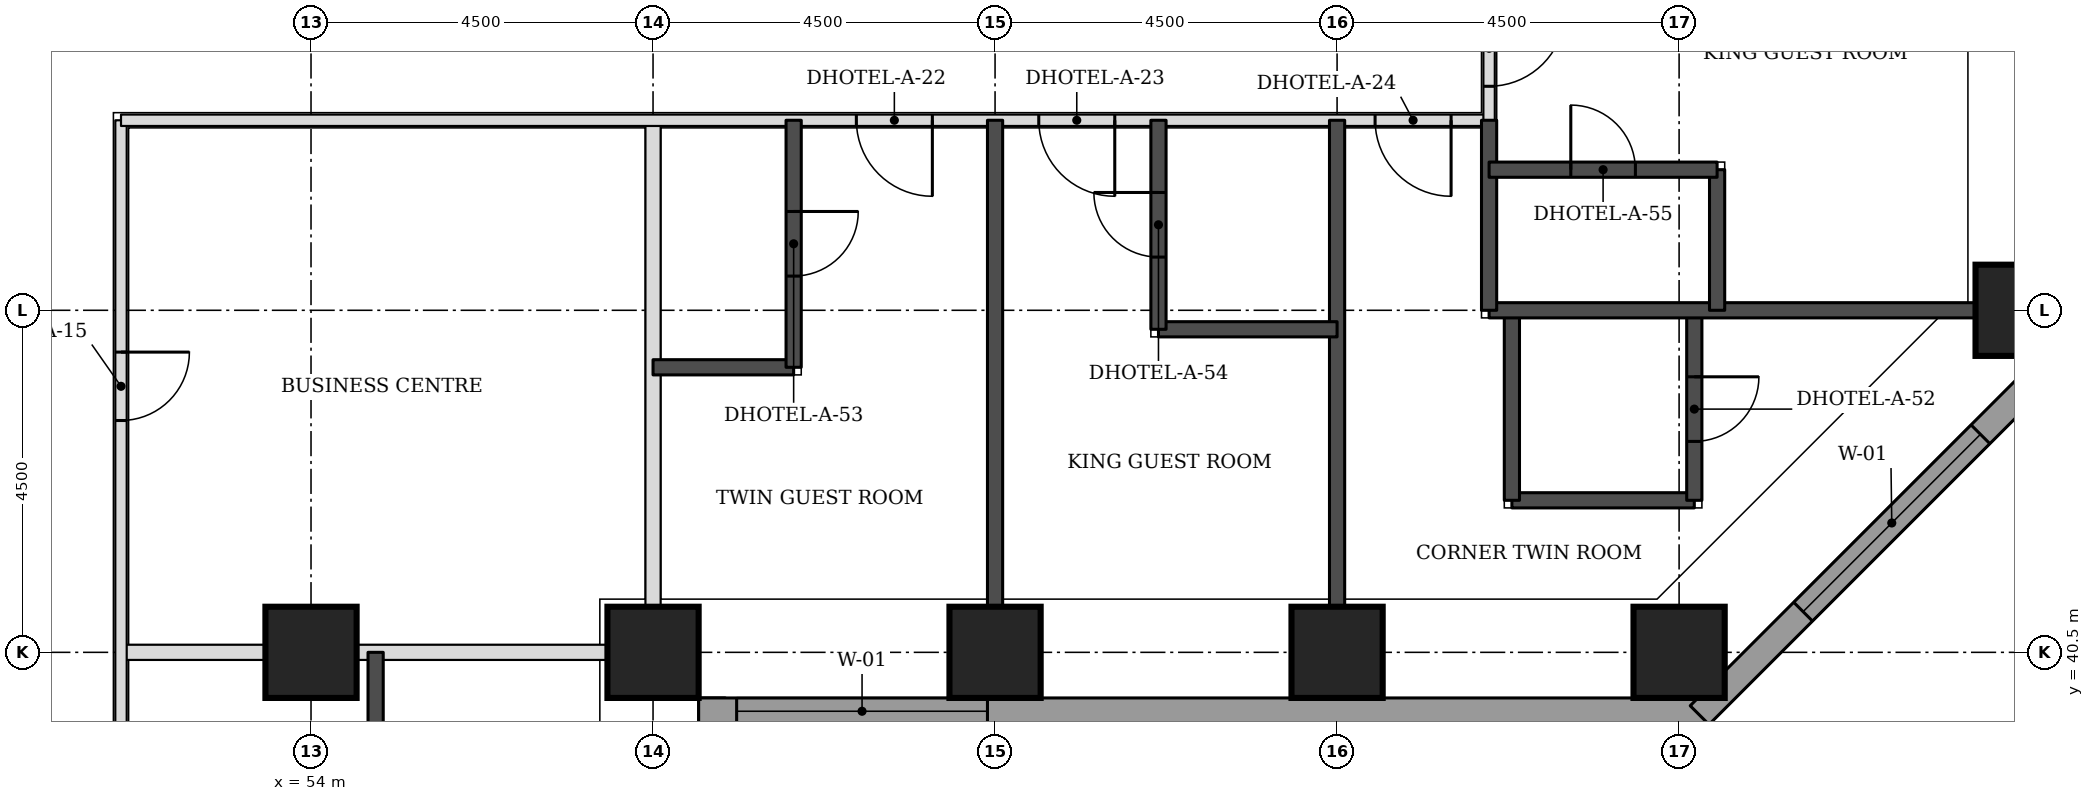
"""IFC4 building model, lengths in metres.
Left out: names, types, materials, properties, quantities, classifications, styles, units other than length and angle.
Written with IfcOpenShell. Run it as: python <this file> out.ifc"""

import sys

from ifc_helpers import new_model, si_unit, direction, frame, frame_2d, origin, origin_2d, place, context, subcontext, project, spatial, rectangle, extrude, element, fill, save


model = new_model("IFC4")
c1 = context("Model", 3, precision=1e-05, world=origin(), true_north=direction((0.0, 1.0)))
c2 = subcontext(c1, "Body", "Model", "MODEL_VIEW")
j1 = project(units=[si_unit("LENGTHUNIT", "METRE"), si_unit("PLANEANGLEUNIT", "RADIAN")], contexts=[c1])
p1 = place(None, origin())
s1 = spatial("IfcSite", under=j1, at=p1, CompositionType="ELEMENT")
p2 = place(p1, origin())
s2 = spatial("IfcBuilding", under=s1, at=p2, CompositionType="ELEMENT")
p3 = place(p2, frame((0.0, 0.0, 26.4)))
s3 = spatial("IfcBuildingStorey", under=s2, at=p3, CompositionType="ELEMENT", Elevation=26.4)
for number, where, z_axis, x_axis in (
    (1, (54.0, 40.5, 0.0), (0.0, 0.0, 1.0), (1.0, 0.0, 0.0)),
    (2, (58.5, 40.5, 0.0), (0.0, 0.0, 1.0), (1.0, 0.0, 0.0)),
    (3, (63.0, 40.5, 0.0), (0.0, 0.0, 1.0), (1.0, 0.0, 0.0)),
    (4, (67.5, 40.5, 0.0), (0.0, 0.0, 1.0), (1.0, 0.0, 0.0)),
    (5, (72.0, 40.5, 0.0), (0.0, 0.0, 1.0), (1.0, 0.0, 0.0)),
    (6, (76.5, 45.0, 0.0), (0.0, 0.0, 1.0), (1.0, 0.0, 0.0)),
):
    element("IfcColumn", number, at=place(p3, frame(where, z_axis=z_axis, x_axis=x_axis)), inside=s3, PredefinedType="COLUMN", context=c2, shape_type="SweptSolid", body=[
        extrude(rectangle(XDim=1.2, YDim=1.2, at=origin_2d()), origin(), (0.0, 0.0, 1.0), 3.3),
    ])
p4 = place(p3, frame((59.275, 22.106, 0.0), z_axis=(0.0, 0.0, 1.0), x_axis=(0.0, 1.0, 0.0)))
e7 = element("IfcWall", 7, at=p4, inside=s3, PredefinedType="STANDARD", context=c2, shape_type="SweptSolid", body=[
    extrude(rectangle(XDim=17.793, YDim=0.35, at=frame_2d((8.897, 0.0))), origin(), (0.0, 0.0, 1.0), 3.055),
])
p5 = place(p4, frame((5.493, 0.0, 0.8)))
e8 = element("IfcOpeningElement", 8, at=p5, cuts=e7, PredefinedType="OPENING", context=c2, shape_type="SweptSolid", body=[
    extrude(rectangle(XDim=3.3, YDim=1.5, at=frame_2d((1.65, 0.75))), frame((0.0, 0.185, 0.0), z_axis=(0.0, -1.0, 0.0), x_axis=(1.0, 0.0, 0.0)), (0.0, 0.0, 1.0), 0.37),
])
p6 = place(p4, frame((13.993, 0.0, 0.8)))
e9 = element("IfcOpeningElement", 9, at=p6, cuts=e7, PredefinedType="OPENING", context=c2, shape_type="SweptSolid", body=[
    extrude(rectangle(XDim=3.3, YDim=1.5, at=frame_2d((1.65, 0.75))), frame((0.0, 0.185, 0.0), z_axis=(0.0, -1.0, 0.0), x_axis=(1.0, 0.0, 0.0)), (0.0, 0.0, 1.0), 0.37),
])
p7 = place(p3, frame((59.1, 39.725, 0.0), z_axis=(0.0, 0.0, 1.0), x_axis=(1.0, 0.0, 0.0)))
e10 = element("IfcWall", 10, at=p7, inside=s3, PredefinedType="STANDARD", context=c2, shape_type="SweptSolid", body=[
    extrude(rectangle(XDim=13.293, YDim=0.35, at=frame_2d((6.647, 0.0))), origin(), (0.0, 0.0, 1.0), 3.055),
])
p8 = place(p7, frame((0.5, 0.0, 0.8)))
e11 = element("IfcOpeningElement", 11, at=p8, cuts=e10, PredefinedType="OPENING", context=c2, shape_type="SweptSolid", body=[
    extrude(rectangle(XDim=3.3, YDim=1.5, at=frame_2d((1.65, 0.75))), frame((0.0, 0.185, 0.0), z_axis=(0.0, -1.0, 0.0), x_axis=(1.0, 0.0, 0.0)), (0.0, 0.0, 1.0), 0.37),
])
p9 = place(p3, frame((72.27, 39.674, 0.0), z_axis=(0.0, 0.0, 1.0), x_axis=(0.707106781187, 0.707106781187, 0.0)))
e12 = element("IfcWall", 12, at=p9, inside=s3, PredefinedType="STANDARD", context=c2, shape_type="SweptSolid", body=[
    extrude(rectangle(XDim=7.151, YDim=0.35, at=frame_2d((3.576, 0.0))), origin(), (0.0, 0.0, 1.0), 3.055),
])
p10 = place(p9, frame((1.926, 0.0, 0.8)))
e13 = element("IfcOpeningElement", 13, at=p10, cuts=e12, PredefinedType="OPENING", context=c2, shape_type="SweptSolid", body=[
    extrude(rectangle(XDim=3.3, YDim=1.5, at=frame_2d((1.65, 0.75))), frame((0.0, 0.185, 0.0), z_axis=(0.0, -1.0, 0.0), x_axis=(1.0, 0.0, 0.0)), (0.0, 0.0, 1.0), 0.37),
])
p11 = place(p3, frame((51.5, 40.5, 0.0), z_axis=(0.0, 0.0, 1.0), x_axis=(1.0, 0.0, 0.0)))
e14 = element("IfcWall", 14, at=p11, inside=s3, PredefinedType="PARTITIONING", context=c2, shape_type="SweptSolid", body=[
    extrude(rectangle(XDim=6.4, YDim=0.2, at=frame_2d((3.2, 0.0))), origin(), (0.0, 0.0, 1.0), 2.33),
])
p12 = place(p3, frame((58.5, 41.1, 0.0), z_axis=(0.0, 0.0, 1.0), x_axis=(0.0, 1.0, 0.0)))
e15 = element("IfcWall", 15, at=p12, inside=s3, PredefinedType="PARTITIONING", context=c2, shape_type="SweptSolid", body=[
    extrude(rectangle(XDim=6.4, YDim=0.2, at=frame_2d((3.2, 0.0))), origin(), (0.0, 0.0, 1.0), 3.08),
])
p13 = place(p3, frame((51.5, 23.65, 0.0), z_axis=(0.0, 0.0, 1.0), x_axis=(0.0, 1.0, 0.0)))
e16 = element("IfcWall", 16, at=p13, inside=s3, PredefinedType="PARTITIONING", context=c2, shape_type="SweptSolid", body=[
    extrude(rectangle(XDim=23.85, YDim=0.15, at=frame_2d((11.925, 0.0))), origin(), (0.0, 0.0, 1.0), 3.08),
])
p14 = place(p13, frame((4.075, 0.0, 0.0)))
e17 = element("IfcOpeningElement", 17, at=p14, cuts=e16, PredefinedType="OPENING", context=c2, shape_type="SweptSolid", body=[
    extrude(rectangle(XDim=1.0, YDim=2.1, at=frame_2d((0.5, 1.05))), frame((0.0, 0.085, 0.0), z_axis=(0.0, -1.0, 0.0), x_axis=(1.0, 0.0, 0.0)), (0.0, 0.0, 1.0), 0.17),
])
p15 = place(p13, frame((10.375, 0.0, 0.0)))
e18 = element("IfcOpeningElement", 18, at=p15, cuts=e16, PredefinedType="OPENING", context=c2, shape_type="SweptSolid", body=[
    extrude(rectangle(XDim=1.0, YDim=2.1, at=frame_2d((0.5, 1.05))), frame((0.0, 0.085, 0.0), z_axis=(0.0, -1.0, 0.0), x_axis=(1.0, 0.0, 0.0)), (0.0, 0.0, 1.0), 0.17),
])
p16 = place(p13, frame((19.9, 0.0, 0.0)))
e19 = element("IfcOpeningElement", 19, at=p16, cuts=e16, PredefinedType="OPENING", context=c2, shape_type="SweptSolid", body=[
    extrude(rectangle(XDim=0.9, YDim=2.1, at=frame_2d((0.45, 1.05))), frame((0.0, 0.085, 0.0), z_axis=(0.0, -1.0, 0.0), x_axis=(1.0, 0.0, 0.0)), (0.0, 0.0, 1.0), 0.17),
])
p17 = place(p3, frame((51.5, 47.5, 0.0), z_axis=(0.0, 0.0, 1.0), x_axis=(1.0, 0.0, 0.0)))
e20 = element("IfcWall", 20, at=p17, inside=s3, PredefinedType="PARTITIONING", context=c2, shape_type="SweptSolid", body=[
    extrude(rectangle(XDim=18.0, YDim=0.15, at=frame_2d((9.0, 0.0))), origin(), (0.0, 0.0, 1.0), 3.08),
])
p18 = place(p17, frame((12.075, 0.0, 0.0)))
e21 = element("IfcOpeningElement", 21, at=p18, cuts=e20, PredefinedType="OPENING", context=c2, shape_type="SweptSolid", body=[
    extrude(rectangle(XDim=1.0, YDim=2.1, at=frame_2d((0.5, 1.05))), frame((0.0, 0.085, 0.0), z_axis=(0.0, -1.0, 0.0), x_axis=(1.0, 0.0, 0.0)), (0.0, 0.0, 1.0), 0.17),
])
p19 = place(p17, frame((9.675, 0.0, 0.0)))
e22 = element("IfcOpeningElement", 22, at=p19, cuts=e20, PredefinedType="OPENING", context=c2, shape_type="SweptSolid", body=[
    extrude(rectangle(XDim=1.0, YDim=2.1, at=frame_2d((0.5, 1.05))), frame((0.0, 0.085, 0.0), z_axis=(0.0, -1.0, 0.0), x_axis=(1.0, 0.0, 0.0)), (0.0, 0.0, 1.0), 0.17),
])
p20 = place(p17, frame((16.5, 0.0, 0.0)))
e23 = element("IfcOpeningElement", 23, at=p20, cuts=e20, PredefinedType="OPENING", context=c2, shape_type="SweptSolid", body=[
    extrude(rectangle(XDim=1.0, YDim=2.1, at=frame_2d((0.5, 1.05))), frame((0.0, 0.085, 0.0), z_axis=(0.0, -1.0, 0.0), x_axis=(1.0, 0.0, 0.0)), (0.0, 0.0, 1.0), 0.17),
])
p21 = place(p3, frame((69.5, 47.5, 0.0), z_axis=(0.0, 0.0, 1.0), x_axis=(0.0, 1.0, 0.0)))
e24 = element("IfcWall", 24, at=p21, inside=s3, PredefinedType="PARTITIONING", context=c2, shape_type="SweptSolid", body=[
    extrude(rectangle(XDim=26.5, YDim=0.15, at=frame_2d((13.25, 0.0))), origin(), (0.0, 0.0, 1.0), 3.08),
])
p22 = place(p21, frame((22.525, 0.0, 0.0)))
e25 = element("IfcOpeningElement", 25, at=p22, cuts=e24, PredefinedType="OPENING", context=c2, shape_type="SweptSolid", body=[
    extrude(rectangle(XDim=1.0, YDim=2.1, at=frame_2d((0.5, 1.05))), frame((0.0, 0.085, 0.0), z_axis=(0.0, -1.0, 0.0), x_axis=(1.0, 0.0, 0.0)), (0.0, 0.0, 1.0), 0.17),
])
p23 = place(p21, frame((16.225, 0.0, 0.0)))
e26 = element("IfcOpeningElement", 26, at=p23, cuts=e24, PredefinedType="OPENING", context=c2, shape_type="SweptSolid", body=[
    extrude(rectangle(XDim=1.0, YDim=2.1, at=frame_2d((0.5, 1.05))), frame((0.0, 0.085, 0.0), z_axis=(0.0, -1.0, 0.0), x_axis=(1.0, 0.0, 0.0)), (0.0, 0.0, 1.0), 0.17),
])
p24 = place(p21, frame((4.25, 0.0, 0.0)))
e27 = element("IfcOpeningElement", 27, at=p24, cuts=e24, PredefinedType="OPENING", context=c2, shape_type="SweptSolid", body=[
    extrude(rectangle(XDim=1.1, YDim=2.1, at=frame_2d((0.55, 1.05))), frame((0.0, 0.085, 0.0), z_axis=(0.0, -1.0, 0.0), x_axis=(1.0, 0.0, 0.0)), (0.0, 0.0, 1.0), 0.17),
])
p25 = place(p21, frame((0.447, 0.0, 0.0)))
e28 = element("IfcOpeningElement", 28, at=p25, cuts=e24, PredefinedType="OPENING", context=c2, shape_type="SweptSolid", body=[
    extrude(rectangle(XDim=1.0, YDim=2.1, at=frame_2d((0.5, 1.05))), frame((0.0, 0.085, 0.0), z_axis=(0.0, -1.0, 0.0), x_axis=(1.0, 0.0, 0.0)), (0.0, 0.0, 1.0), 0.17),
])
p26 = place(p3, frame((54.85, 37.55, 0.0), z_axis=(0.0, 0.0, 1.0), x_axis=(0.0, 1.0, 0.0)))
e29 = element("IfcWall", 29, at=p26, inside=s3, PredefinedType="SOLIDWALL", context=c2, shape_type="SweptSolid", body=[
    extrude(rectangle(XDim=2.95, YDim=0.2, at=frame_2d((1.475, 0.0))), origin(), (0.0, 0.0, 1.0), 3.08),
])
for number, where, z_axis, x_axis in (
    (30, (63.0, 41.1, 0.0), (0.0, 0.0, 1.0), (0.0, 1.0, 0.0)),
    (31, (67.5, 41.1, 0.0), (0.0, 0.0, 1.0), (0.0, 1.0, 0.0)),
):
    element("IfcWall", number, at=place(p3, frame(where, z_axis=z_axis, x_axis=x_axis)), inside=s3, PredefinedType="SOLIDWALL", context=c2, shape_type="SweptSolid", body=[
        extrude(rectangle(XDim=6.4, YDim=0.2, at=frame_2d((3.2, 0.0))), origin(), (0.0, 0.0, 1.0), 3.08),
    ])
p27 = place(p3, frame((69.8, 42.5, 0.0), z_axis=(0.0, 0.0, 1.0), x_axis=(1.0, 0.0, 0.0)))
e32 = element("IfcWall", 32, at=p27, inside=s3, PredefinedType="SOLIDWALL", context=c2, shape_type="SweptSolid", body=[
    extrude(rectangle(XDim=2.4, YDim=0.2, at=frame_2d((1.2, 0.0))), origin(), (0.0, 0.0, 1.0), 3.08),
])
p28 = place(p3, frame((69.8, 42.5, 0.0), z_axis=(0.0, 0.0, 1.0), x_axis=(0.0, 1.0, 0.0)))
e33 = element("IfcWall", 33, at=p28, inside=s3, PredefinedType="SOLIDWALL", context=c2, shape_type="SweptSolid", body=[
    extrude(rectangle(XDim=2.5, YDim=0.2, at=frame_2d((1.25, 0.0))), origin(), (0.0, 0.0, 1.0), 3.08),
])
p29 = place(p3, frame((72.2, 42.5, 0.0), z_axis=(0.0, 0.0, 1.0), x_axis=(0.0, 1.0, 0.0)))
e34 = element("IfcWall", 34, at=p29, inside=s3, PredefinedType="SOLIDWALL", context=c2, shape_type="SweptSolid", body=[
    extrude(rectangle(XDim=2.5, YDim=0.2, at=frame_2d((1.25, 0.0))), origin(), (0.0, 0.0, 1.0), 3.08),
])
p30 = place(p29, frame((0.775, 0.0, 0.0)))
e35 = element("IfcOpeningElement", 35, at=p30, cuts=e34, PredefinedType="OPENING", context=c2, shape_type="SweptSolid", body=[
    extrude(rectangle(XDim=0.85, YDim=2.1, at=frame_2d((0.425, 1.05))), frame((0.0, 0.11, 0.0), z_axis=(0.0, -1.0, 0.0), x_axis=(1.0, 0.0, 0.0)), (0.0, 0.0, 1.0), 0.22),
])
p31 = place(p3, frame((58.5, 44.25, 0.0), z_axis=(0.0, 0.0, 1.0), x_axis=(1.0, 0.0, 0.0)))
e36 = element("IfcWall", 36, at=p31, inside=s3, PredefinedType="SOLIDWALL", context=c2, shape_type="SweptSolid", body=[
    extrude(rectangle(XDim=1.85, YDim=0.2, at=frame_2d((0.925, 0.0))), origin(), (0.0, 0.0, 1.0), 3.08),
])
p32 = place(p3, frame((60.35, 44.25, 0.0), z_axis=(0.0, 0.0, 1.0), x_axis=(0.0, 1.0, 0.0)))
e37 = element("IfcWall", 37, at=p32, inside=s3, PredefinedType="SOLIDWALL", context=c2, shape_type="SweptSolid", body=[
    extrude(rectangle(XDim=3.25, YDim=0.2, at=frame_2d((1.625, 0.0))), origin(), (0.0, 0.0, 1.0), 3.08),
])
p33 = place(p32, frame((1.2, 0.0, 0.0)))
e38 = element("IfcOpeningElement", 38, at=p33, cuts=e37, PredefinedType="OPENING", context=c2, shape_type="SweptSolid", body=[
    extrude(rectangle(XDim=0.85, YDim=2.1, at=frame_2d((0.425, 1.05))), frame((0.0, 0.11, 0.0), z_axis=(0.0, -1.0, 0.0), x_axis=(1.0, 0.0, 0.0)), (0.0, 0.0, 1.0), 0.22),
])
p34 = place(p3, frame((65.15, 44.75, 0.0), z_axis=(0.0, 0.0, 1.0), x_axis=(1.0, 0.0, 0.0)))
e39 = element("IfcWall", 39, at=p34, inside=s3, PredefinedType="SOLIDWALL", context=c2, shape_type="SweptSolid", body=[
    extrude(rectangle(XDim=2.35, YDim=0.2, at=frame_2d((1.175, 0.0))), origin(), (0.0, 0.0, 1.0), 3.08),
])
p35 = place(p3, frame((65.15, 44.75, 0.0), z_axis=(0.0, 0.0, 1.0), x_axis=(0.0, 1.0, 0.0)))
e40 = element("IfcWall", 40, at=p35, inside=s3, PredefinedType="SOLIDWALL", context=c2, shape_type="SweptSolid", body=[
    extrude(rectangle(XDim=2.75, YDim=0.2, at=frame_2d((1.375, 0.0))), origin(), (0.0, 0.0, 1.0), 3.08),
])
p36 = place(p35, frame((0.95, 0.0, 0.0)))
e41 = element("IfcOpeningElement", 41, at=p36, cuts=e40, PredefinedType="OPENING", context=c2, shape_type="SweptSolid", body=[
    extrude(rectangle(XDim=0.85, YDim=2.1, at=frame_2d((0.425, 1.05))), frame((0.0, 0.11, 0.0), z_axis=(0.0, -1.0, 0.0), x_axis=(1.0, 0.0, 0.0)), (0.0, 0.0, 1.0), 0.22),
])
p37 = place(p3, frame((69.5, 45.0, 0.0), z_axis=(0.0, 0.0, 1.0), x_axis=(1.0, 0.0, 0.0)))
e42 = element("IfcWall", 42, at=p37, inside=s3, PredefinedType="SOLIDWALL", context=c2, shape_type="SweptSolid", body=[
    extrude(rectangle(XDim=6.4, YDim=0.2, at=frame_2d((3.2, 0.0))), origin(), (0.0, 0.0, 1.0), 3.08),
])
p38 = place(p3, frame((69.5, 45.0, 0.0), z_axis=(0.0, 0.0, 1.0), x_axis=(0.0, 1.0, 0.0)))
e43 = element("IfcWall", 43, at=p38, inside=s3, PredefinedType="SOLIDWALL", context=c2, shape_type="SweptSolid", body=[
    extrude(rectangle(XDim=2.5, YDim=0.2, at=frame_2d((1.25, 0.0))), origin(), (0.0, 0.0, 1.0), 3.08),
])
p39 = place(p3, frame((72.5, 45.0, 0.0), z_axis=(0.0, 0.0, 1.0), x_axis=(0.0, 1.0, 0.0)))
e44 = element("IfcWall", 44, at=p39, inside=s3, PredefinedType="SOLIDWALL", context=c2, shape_type="SweptSolid", body=[
    extrude(rectangle(XDim=1.85, YDim=0.2, at=frame_2d((0.925, 0.0))), origin(), (0.0, 0.0, 1.0), 3.08),
])
p40 = place(p3, frame((69.5, 46.85, 0.0), z_axis=(0.0, 0.0, 1.0), x_axis=(1.0, 0.0, 0.0)))
e45 = element("IfcWall", 45, at=p40, inside=s3, PredefinedType="SOLIDWALL", context=c2, shape_type="SweptSolid", body=[
    extrude(rectangle(XDim=3.0, YDim=0.2, at=frame_2d((1.5, 0.0))), origin(), (0.0, 0.0, 1.0), 3.08),
])
p41 = place(p40, frame((1.075, 0.0, 0.0)))
e46 = element("IfcOpeningElement", 46, at=p41, cuts=e45, PredefinedType="OPENING", context=c2, shape_type="SweptSolid", body=[
    extrude(rectangle(XDim=0.85, YDim=2.1, at=frame_2d((0.425, 1.05))), frame((0.0, 0.11, 0.0), z_axis=(0.0, -1.0, 0.0), x_axis=(1.0, 0.0, 0.0)), (0.0, 0.0, 1.0), 0.22),
])
p42 = place(p8, origin())
e47 = element("IfcWindow", 47, at=p42, inside=s3, PartitioningType="SINGLE_PANEL", PredefinedType="WINDOW", context=c2, shape_type="SweptSolid", body=[
    extrude(rectangle(XDim=3.3, YDim=1.5, at=frame_2d((1.65, 0.75))), frame((0.0, 0.085, 0.0), z_axis=(0.0, -1.0, 0.0), x_axis=(1.0, 0.0, 0.0)), (0.0, 0.0, 1.0), 0.06),
])
fill(e11, e47)
p43 = place(p10, origin())
e48 = element("IfcWindow", 48, at=p43, inside=s3, PartitioningType="SINGLE_PANEL", PredefinedType="WINDOW", context=c2, shape_type="SweptSolid", body=[
    extrude(rectangle(XDim=3.3, YDim=1.5, at=frame_2d((1.65, 0.75))), frame((0.0, 0.085, 0.0), z_axis=(0.0, -1.0, 0.0), x_axis=(1.0, 0.0, 0.0)), (0.0, 0.0, 1.0), 0.06),
])
fill(e13, e48)
p44 = place(p25, frame((1.0, 0.0, 0.0), z_axis=(0.0, 0.0, 1.0), x_axis=(-1.0, 0.0, 0.0)))
e49 = element("IfcDoor", 49, at=p44, inside=s3, OperationType="SINGLE_SWING_LEFT", PredefinedType="DOOR", context=c2, shape_type="SweptSolid", body=[
    extrude(rectangle(XDim=1.0, YDim=2.1, at=frame_2d((0.5, 1.05))), frame((0.0, 0.025, 0.0), z_axis=(0.0, -1.0, 0.0), x_axis=(1.0, 0.0, 0.0)), (0.0, 0.0, 1.0), 0.05),
])
fill(e28, e49)
p45 = place(p41, origin())
e50 = element("IfcDoor", 50, at=p45, inside=s3, OperationType="SINGLE_SWING_LEFT", PredefinedType="DOOR", context=c2, shape_type="SweptSolid", body=[
    extrude(rectangle(XDim=0.85, YDim=2.1, at=frame_2d((0.425, 1.05))), frame((0.0, 0.025, 0.0), z_axis=(0.0, -1.0, 0.0), x_axis=(1.0, 0.0, 0.0)), (0.0, 0.0, 1.0), 0.05),
])
fill(e46, e50)
p46 = place(p18, frame((1.0, 0.0, 0.0), z_axis=(0.0, 0.0, 1.0), x_axis=(-1.0, 0.0, 0.0)))
e51 = element("IfcDoor", 51, at=p46, inside=s3, OperationType="SINGLE_SWING_LEFT", PredefinedType="DOOR", context=c2, shape_type="SweptSolid", body=[
    extrude(rectangle(XDim=1.0, YDim=2.1, at=frame_2d((0.5, 1.05))), frame((0.0, 0.025, 0.0), z_axis=(0.0, -1.0, 0.0), x_axis=(1.0, 0.0, 0.0)), (0.0, 0.0, 1.0), 0.05),
])
fill(e21, e51)
p47 = place(p36, origin())
e52 = element("IfcDoor", 52, at=p47, inside=s3, OperationType="SINGLE_SWING_RIGHT", PredefinedType="DOOR", context=c2, shape_type="SweptSolid", body=[
    extrude(rectangle(XDim=0.85, YDim=2.1, at=frame_2d((0.425, 1.05))), frame((0.0, 0.025, 0.0), z_axis=(0.0, -1.0, 0.0), x_axis=(1.0, 0.0, 0.0)), (0.0, 0.0, 1.0), 0.05),
])
fill(e41, e52)
p48 = place(p19, frame((1.0, 0.0, 0.0), z_axis=(0.0, 0.0, 1.0), x_axis=(-1.0, 0.0, 0.0)))
e53 = element("IfcDoor", 53, at=p48, inside=s3, OperationType="SINGLE_SWING_LEFT", PredefinedType="DOOR", context=c2, shape_type="SweptSolid", body=[
    extrude(rectangle(XDim=1.0, YDim=2.1, at=frame_2d((0.5, 1.05))), frame((0.0, 0.025, 0.0), z_axis=(0.0, -1.0, 0.0), x_axis=(1.0, 0.0, 0.0)), (0.0, 0.0, 1.0), 0.05),
])
fill(e22, e53)
p49 = place(p33, frame((0.85, 0.0, 0.0), z_axis=(0.0, 0.0, 1.0), x_axis=(-1.0, 0.0, 0.0)))
e54 = element("IfcDoor", 54, at=p49, inside=s3, OperationType="SINGLE_SWING_LEFT", PredefinedType="DOOR", context=c2, shape_type="SweptSolid", body=[
    extrude(rectangle(XDim=0.85, YDim=2.1, at=frame_2d((0.425, 1.05))), frame((0.0, 0.025, 0.0), z_axis=(0.0, -1.0, 0.0), x_axis=(1.0, 0.0, 0.0)), (0.0, 0.0, 1.0), 0.05),
])
fill(e38, e54)
p50 = place(p20, frame((1.0, 0.0, 0.0), z_axis=(0.0, 0.0, 1.0), x_axis=(-1.0, 0.0, 0.0)))
e55 = element("IfcDoor", 55, at=p50, inside=s3, OperationType="SINGLE_SWING_LEFT", PredefinedType="DOOR", context=c2, shape_type="SweptSolid", body=[
    extrude(rectangle(XDim=1.0, YDim=2.1, at=frame_2d((0.5, 1.05))), frame((0.0, 0.025, 0.0), z_axis=(0.0, -1.0, 0.0), x_axis=(1.0, 0.0, 0.0)), (0.0, 0.0, 1.0), 0.05),
])
fill(e23, e55)
p51 = place(p30, frame((0.85, 0.0, 0.0), z_axis=(0.0, 0.0, 1.0), x_axis=(-1.0, 0.0, 0.0)))
e56 = element("IfcDoor", 56, at=p51, inside=s3, OperationType="SINGLE_SWING_LEFT", PredefinedType="DOOR", context=c2, shape_type="SweptSolid", body=[
    extrude(rectangle(XDim=0.85, YDim=2.1, at=frame_2d((0.425, 1.05))), frame((0.0, 0.025, 0.0), z_axis=(0.0, -1.0, 0.0), x_axis=(1.0, 0.0, 0.0)), (0.0, 0.0, 1.0), 0.05),
])
fill(e35, e56)
p52 = place(p16, frame((0.9, 0.0, 0.0), z_axis=(0.0, 0.0, 1.0), x_axis=(-1.0, 0.0, 0.0)))
e57 = element("IfcDoor", 57, at=p52, inside=s3, OperationType="SINGLE_SWING_LEFT", PredefinedType="DOOR", context=c2, shape_type="SweptSolid", body=[
    extrude(rectangle(XDim=0.9, YDim=2.1, at=frame_2d((0.45, 1.05))), frame((0.0, 0.025, 0.0), z_axis=(0.0, -1.0, 0.0), x_axis=(1.0, 0.0, 0.0)), (0.0, 0.0, 1.0), 0.05),
])
fill(e19, e57)
save(model, sys.argv[1])
